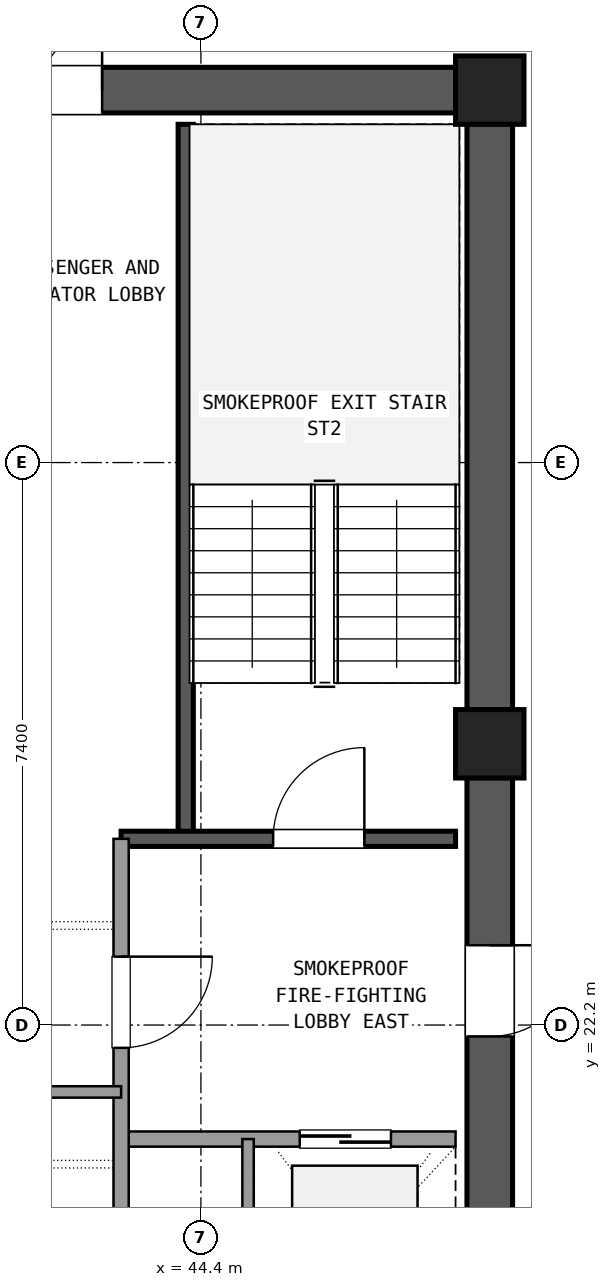
"""IFC4 building model, lengths in metres.
Left out: names, types, materials, properties, quantities, classifications, styles, units other than length and angle.
Written with IfcOpenShell. Run it as: python <this file> out.ifc"""

import sys

from ifc_helpers import new_model, si_unit, direction, frame, frame_2d, origin, origin_2d, place, context, subcontext, project, spatial, rectangle, extrude, element, fill, save


model = new_model("IFC4")
c1 = context("Model", 3, precision=1e-05, world=origin(), true_north=direction((0.0, 1.0)))
c2 = subcontext(c1, "Body", "Model", "MODEL_VIEW")
j1 = project(units=[si_unit("LENGTHUNIT", "METRE"), si_unit("PLANEANGLEUNIT", "RADIAN")], contexts=[c1])
p1 = place(None, origin())
s1 = spatial("IfcSite", under=j1, at=p1, CompositionType="ELEMENT")
p2 = place(p1, origin())
s2 = spatial("IfcBuilding", under=s1, at=p2, CompositionType="ELEMENT")
p3 = place(p2, frame((0.0, 0.0, 199.98)))
s3 = spatial("IfcBuildingStorey", under=s2, at=p3, CompositionType="ELEMENT", Elevation=199.98)
for number, where, z_axis, x_axis in (
    (1, (48.2, 25.9, 0.0), (0.0, 0.0, 1.0), (1.0, 0.0, 0.0)),
    (2, (48.2, 34.5, 0.0), (0.0, 0.0, 1.0), (1.0, 0.0, 0.0)),
):
    element("IfcColumn", number, at=place(p3, frame(where, z_axis=z_axis, x_axis=x_axis)), inside=s3, PredefinedType="COLUMN", context=c2, shape_type="SweptSolid", body=[
        extrude(rectangle(XDim=0.9, YDim=0.9, at=origin_2d()), origin(), (0.0, 0.0, 1.0), 3.6),
    ])
p4 = place(p3, frame((48.2, 17.745, 0.0), z_axis=(0.0, 0.0, 1.0), x_axis=(0.0, 1.0, 0.0)))
e3 = element("IfcWall", 3, at=p4, inside=s3, PredefinedType="SHEAR", context=c2, shape_type="SweptSolid", body=[
    extrude(rectangle(XDim=7.71, YDim=0.6, at=frame_2d((3.855, 0.0))), origin(), (0.0, 0.0, 1.0), 3.32),
])
p5 = place(p4, frame((4.305, 0.0, 0.0)))
e4 = element("IfcOpeningElement", 4, at=p5, cuts=e3, PredefinedType="OPENING", context=c2, shape_type="SweptSolid", body=[
    extrude(rectangle(XDim=1.2, YDim=2.15, at=frame_2d((0.6, 1.075))), frame((0.0, 0.31, 0.0), z_axis=(0.0, -1.0, 0.0), x_axis=(1.0, 0.0, 0.0)), (0.0, 0.0, 1.0), 0.62),
])
p6 = place(p3, frame((48.2, 26.345, 0.0), z_axis=(0.0, 0.0, 1.0), x_axis=(0.0, 1.0, 0.0)))
e5 = element("IfcWall", 5, at=p6, inside=s3, PredefinedType="SHEAR", context=c2, shape_type="SweptSolid", body=[
    extrude(rectangle(XDim=7.71, YDim=0.6, at=frame_2d((3.855, 0.0))), origin(), (0.0, 0.0, 1.0), 3.32),
])
p7 = place(p3, frame((47.755, 34.5, 0.0), z_axis=(0.0, 0.0, 1.0), x_axis=(-1.0, 0.0, 0.0)))
e6 = element("IfcWall", 6, at=p7, inside=s3, PredefinedType="SHEAR", context=c2, shape_type="SweptSolid", body=[
    extrude(rectangle(XDim=10.31, YDim=0.6, at=frame_2d((5.155, 0.0))), origin(), (0.0, 0.0, 1.0), 3.32),
])
p8 = place(p7, frame((4.655, 0.0, 0.0)))
e7 = element("IfcOpeningElement", 7, at=p8, cuts=e6, PredefinedType="OPENING", context=c2, shape_type="SweptSolid", body=[
    extrude(rectangle(XDim=1.6, YDim=2.2, at=frame_2d((0.8, 1.1))), frame((0.0, 0.31, 0.0), z_axis=(0.0, -1.0, 0.0), x_axis=(1.0, 0.0, 0.0)), (0.0, 0.0, 1.0), 0.62),
])
p9 = place(p3, frame((44.2, 24.65, 0.0), z_axis=(0.0, 0.0, 1.0), x_axis=(0.0, 1.0, 0.0)))
e8 = element("IfcWall", 8, at=p9, inside=s3, PredefinedType="SHEAR", context=c2, shape_type="SweptSolid", body=[
    extrude(rectangle(XDim=9.4, YDim=0.2, at=frame_2d((4.7, 0.0))), origin(), (0.0, 0.0, 1.0), 3.32),
])
p10 = place(p3, frame((43.35, 24.65, 0.0), z_axis=(0.0, 0.0, 1.0), x_axis=(1.0, 0.0, 0.0)))
e9 = element("IfcWall", 9, at=p10, inside=s3, PredefinedType="SHEAR", context=c2, shape_type="SweptSolid", body=[
    extrude(rectangle(XDim=4.4, YDim=0.2, at=frame_2d((2.2, 0.0))), origin(), (0.0, 0.0, 1.0), 3.32),
])
p11 = place(p10, frame((2.0, 0.0, 0.0)))
e10 = element("IfcOpeningElement", 10, at=p11, cuts=e9, PredefinedType="OPENING", context=c2, shape_type="SweptSolid", body=[
    extrude(rectangle(XDim=1.2, YDim=2.15, at=frame_2d((0.6, 1.075))), frame((0.0, 0.11, 0.0), z_axis=(0.0, -1.0, 0.0), x_axis=(1.0, 0.0, 0.0)), (0.0, 0.0, 1.0), 0.22),
])
p12 = place(p3, frame((43.35, 20.7, 0.0), z_axis=(0.0, 0.0, 1.0), x_axis=(1.0, 0.0, 0.0)))
e11 = element("IfcWall", 11, at=p12, inside=s3, PredefinedType="SOLIDWALL", context=c2, shape_type="SweptSolid", body=[
    extrude(rectangle(XDim=4.4, YDim=0.2, at=frame_2d((2.2, 0.0))), origin(), (0.0, 0.0, 1.0), 2.61),
])
p13 = place(p12, frame((2.35, 0.0, 0.0)))
e12 = element("IfcOpeningElement", 12, at=p13, cuts=e11, PredefinedType="OPENING", context=c2, shape_type="SweptSolid", body=[
    extrude(rectangle(XDim=1.2, YDim=2.15, at=frame_2d((0.6, 1.075))), frame((0.0, 0.11, 0.0), z_axis=(0.0, -1.0, 0.0), x_axis=(1.0, 0.0, 0.0)), (0.0, 0.0, 1.0), 0.22),
])
p14 = place(p3, frame((43.35, 17.75, 0.0), z_axis=(0.0, 0.0, 1.0), x_axis=(0.0, 1.0, 0.0)))
e13 = element("IfcWall", 13, at=p14, inside=s3, PredefinedType="SOLIDWALL", context=c2, shape_type="SweptSolid", body=[
    extrude(rectangle(XDim=6.9, YDim=0.2, at=frame_2d((3.45, 0.0))), origin(), (0.0, 0.0, 1.0), 2.61),
])
p15 = place(p14, frame((4.15, 0.0, 0.0)))
e14 = element("IfcOpeningElement", 14, at=p15, cuts=e13, PredefinedType="OPENING", context=c2, shape_type="SweptSolid", body=[
    extrude(rectangle(XDim=1.2, YDim=2.15, at=frame_2d((0.6, 1.075))), frame((0.0, 0.11, 0.0), z_axis=(0.0, -1.0, 0.0), x_axis=(1.0, 0.0, 0.0)), (0.0, 0.0, 1.0), 0.22),
])
p16 = place(p3, frame((45.02, 17.75, 0.0), z_axis=(0.0, 0.0, 1.0), x_axis=(0.0, 1.0, 0.0)))
e15 = element("IfcWall", 15, at=p16, inside=s3, PredefinedType="PARTITIONING", context=c2, shape_type="SweptSolid", body=[
    extrude(rectangle(XDim=2.95, YDim=0.15, at=frame_2d((1.475, 0.0))), origin(), (0.0, 0.0, 1.0), 2.61),
])
p17 = place(p3, frame((37.25, 21.32, 0.0), z_axis=(0.0, 0.0, 1.0), x_axis=(1.0, 0.0, 0.0)))
e16 = element("IfcWall", 16, at=p17, inside=s3, PredefinedType="PARTITIONING", context=c2, shape_type="SweptSolid", body=[
    extrude(rectangle(XDim=6.1, YDim=0.15, at=frame_2d((3.05, 0.0))), origin(), (0.0, 0.0, 1.0), 2.61),
])
p18 = place(p17, frame((0.55, 0.0, 0.0)))
e17 = element("IfcOpeningElement", 17, at=p18, cuts=e16, PredefinedType="OPENING", context=c2, shape_type="SweptSolid", body=[
    extrude(rectangle(XDim=1.0, YDim=2.15, at=frame_2d((0.5, 1.075))), frame((0.0, 0.085, 0.0), z_axis=(0.0, -1.0, 0.0), x_axis=(1.0, 0.0, 0.0)), (0.0, 0.0, 1.0), 0.17),
])
p19 = place(p17, frame((3.5, 0.0, 0.0)))
e18 = element("IfcOpeningElement", 18, at=p19, cuts=e16, PredefinedType="OPENING", context=c2, shape_type="SweptSolid", body=[
    extrude(rectangle(XDim=1.0, YDim=2.15, at=frame_2d((0.5, 1.075))), frame((0.0, 0.085, 0.0), z_axis=(0.0, -1.0, 0.0), x_axis=(1.0, 0.0, 0.0)), (0.0, 0.0, 1.0), 0.17),
])
p20 = place(p11, origin())
e19 = element("IfcDoor", 19, at=p20, inside=s3, OperationType="SINGLE_SWING_RIGHT", PredefinedType="DOOR", context=c2, shape_type="SweptSolid", body=[
    extrude(rectangle(XDim=1.2, YDim=2.15, at=frame_2d((0.6, 1.075))), frame((0.0, 0.025, 0.0), z_axis=(0.0, -1.0, 0.0), x_axis=(1.0, 0.0, 0.0)), (0.0, 0.0, 1.0), 0.05),
])
fill(e10, e19)
p21 = place(p13, origin())
e20 = element("IfcDoor", 20, at=p21, inside=s3, OperationType="SLIDING_TO_RIGHT", PredefinedType="DOOR", context=c2, shape_type="SweptSolid", body=[
    extrude(rectangle(XDim=1.2, YDim=2.15, at=frame_2d((0.6, 1.075))), frame((0.0, 0.025, 0.0), z_axis=(0.0, -1.0, 0.0), x_axis=(1.0, 0.0, 0.0)), (0.0, 0.0, 1.0), 0.05),
])
fill(e12, e20)
p22 = place(p15, frame((1.2, 0.0, 0.0), z_axis=(0.0, 0.0, 1.0), x_axis=(-1.0, 0.0, 0.0)))
e21 = element("IfcDoor", 21, at=p22, inside=s3, OperationType="SINGLE_SWING_RIGHT", PredefinedType="DOOR", context=c2, shape_type="SweptSolid", body=[
    extrude(rectangle(XDim=1.2, YDim=2.15, at=frame_2d((0.6, 1.075))), frame((0.0, 0.025, 0.0), z_axis=(0.0, -1.0, 0.0), x_axis=(1.0, 0.0, 0.0)), (0.0, 0.0, 1.0), 0.05),
])
fill(e14, e21)
p23 = place(p5, frame((1.2, 0.0, 0.0), z_axis=(0.0, 0.0, 1.0), x_axis=(-1.0, 0.0, 0.0)))
e22 = element("IfcDoor", 22, at=p23, inside=s3, OperationType="SINGLE_SWING_RIGHT", PredefinedType="DOOR", context=c2, shape_type="SweptSolid", body=[
    extrude(rectangle(XDim=1.2, YDim=2.15, at=frame_2d((0.6, 1.075))), frame((0.0, 0.025, 0.0), z_axis=(0.0, -1.0, 0.0), x_axis=(1.0, 0.0, 0.0)), (0.0, 0.0, 1.0), 0.05),
])
fill(e4, e22)
p24 = place(p8, frame((1.6, 0.0, 0.0), z_axis=(0.0, 0.0, 1.0), x_axis=(-1.0, 0.0, 0.0)))
e23 = element("IfcDoor", 23, at=p24, inside=s3, OperationType="DOUBLE_DOOR_SINGLE_SWING", PredefinedType="DOOR", context=c2, shape_type="SweptSolid", body=[
    extrude(rectangle(XDim=1.6, YDim=2.2, at=frame_2d((0.8, 1.1))), frame((0.0, 0.025, 0.0), z_axis=(0.0, -1.0, 0.0), x_axis=(1.0, 0.0, 0.0)), (0.0, 0.0, 1.0), 0.05),
])
fill(e7, e23)
save(model, sys.argv[1])
